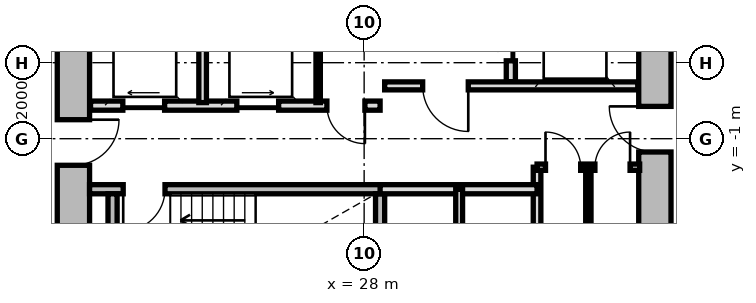
"""IFC4 building model, lengths in metres.
Left out: names, types, materials, properties, quantities, classifications, styles, units other than length and angle.
Written with IfcOpenShell. Run it as: python <this file> out.ifc"""

import sys

from ifc_helpers import new_model, si_unit, direction, frame, frame_2d, origin, place, context, subcontext, project, spatial, rectangle, extrude, source, transform, mapped, element, fill, save


model = new_model("IFC4")
c1 = context("Model", 3, precision=1e-05, world=origin(), true_north=direction((0.0, 1.0)))
c2 = subcontext(c1, "Body", "Model", "MODEL_VIEW")
j1 = project(units=[si_unit("LENGTHUNIT", "METRE"), si_unit("PLANEANGLEUNIT", "RADIAN")], contexts=[c1])
p1 = place(None, origin())
s1 = spatial("IfcSite", under=j1, at=p1, CompositionType="ELEMENT")
p2 = place(p1, origin())
s2 = spatial("IfcBuilding", under=s1, at=p2, CompositionType="ELEMENT")
p3 = place(p2, frame((0.0, 0.0, 49.05)))
s3 = spatial("IfcBuildingStorey", under=s2, at=p3, CompositionType="ELEMENT", Elevation=49.05)
m1 = source(origin(), c2, "Body", "SweptSolid", [
    extrude(rectangle(XDim=11.0, YDim=0.85, at=frame_2d((5.5, 0.0))), origin(), (0.0, 0.0, 1.0), 2.79),
])
p4 = place(p3, frame((20.35, -5.5, 0.0), z_axis=(0.0, 0.0, 1.0), x_axis=(0.0, 1.0, 0.0)))
e1 = element("IfcWall", 1, at=p4, inside=s3, PredefinedType="SHEAR", context=c2, shape_type="MappedRepresentation", body=[
    mapped(m1, transform((0.0, 0.0, 0.0), x_axis=(1.0, 0.0, 0.0), y_axis=(0.0, 1.0, 0.0), z_axis=(0.0, 0.0, 1.0), scale=1.0)),
])
p5 = place(p4, frame((3.8, 0.0, 0.0)))
e2 = element("IfcOpeningElement", 2, at=p5, cuts=e1, PredefinedType="OPENING", context=c2, shape_type="SweptSolid", body=[
    extrude(rectangle(XDim=1.2, YDim=2.15, at=frame_2d((0.6, 1.075))), frame((0.0, 0.435, 0.0), z_axis=(0.0, -1.0, 0.0), x_axis=(1.0, 0.0, 0.0)), (0.0, 0.0, 1.0), 0.87),
])
p6 = place(p3, frame((35.65, 5.5, 0.0), z_axis=(0.0, 0.0, 1.0), x_axis=(0.0, -1.0, 0.0)))
e3 = element("IfcWall", 3, at=p6, inside=s3, PredefinedType="SHEAR", context=c2, shape_type="MappedRepresentation", body=[
    mapped(m1, transform((0.0, 0.0, 0.0), x_axis=(1.0, 0.0, 0.0), y_axis=(0.0, 1.0, 0.0), z_axis=(0.0, 0.0, 1.0), scale=1.0)),
])
p7 = place(p6, frame((5.65, 0.0, 0.0)))
e4 = element("IfcOpeningElement", 4, at=p7, cuts=e3, PredefinedType="OPENING", context=c2, shape_type="SweptSolid", body=[
    extrude(rectangle(XDim=1.2, YDim=2.15, at=frame_2d((0.6, 1.075))), frame((0.0, 0.435, 0.0), z_axis=(0.0, -1.0, 0.0), x_axis=(1.0, 0.0, 0.0)), (0.0, 0.0, 1.0), 0.87),
])
m2 = source(origin(), c2, "Body", "SweptSolid", [
    extrude(rectangle(XDim=7.765, YDim=0.24, at=frame_2d((3.883, 0.0))), origin(), (0.0, 0.0, 1.0), 2.79),
])
p8 = place(p3, frame((20.775, -2.33, 0.0), z_axis=(0.0, 0.0, 1.0), x_axis=(1.0, 0.0, 0.0)))
e5 = element("IfcWall", 5, at=p8, inside=s3, PredefinedType="PARTITIONING", context=c2, shape_type="MappedRepresentation", body=[
    mapped(m2, transform((0.0, 0.0, 0.0), x_axis=(1.0, 0.0, 0.0), y_axis=(0.0, 1.0, 0.0), z_axis=(0.0, 0.0, 1.0), scale=1.0)),
])
p9 = place(p8, frame((0.885, 0.0, 0.0)))
e6 = element("IfcOpeningElement", 6, at=p9, cuts=e5, PredefinedType="OPENING", context=c2, shape_type="SweptSolid", body=[
    extrude(rectangle(XDim=1.1, YDim=2.15, at=frame_2d((0.55, 1.075))), frame((0.0, 0.13, 0.0), z_axis=(0.0, -1.0, 0.0), x_axis=(1.0, 0.0, 0.0)), (0.0, 0.0, 1.0), 0.26),
])
m3 = source(origin(), c2, "Body", "SweptSolid", [
    extrude(rectangle(XDim=3.075, YDim=0.24, at=frame_2d((1.538, 0.0))), origin(), (0.0, 0.0, 1.0), 2.79),
])
for number, where, z_axis, x_axis in (
    (7, (21.38, -5.525, 0.0), (0.0, 0.0, 1.0), (0.0, 1.0, 0.0)),
    (8, (28.42, -5.525, 0.0), (0.0, 0.0, 1.0), (0.0, 1.0, 0.0)),
):
    element("IfcWall", number, at=place(p3, frame(where, z_axis=z_axis, x_axis=x_axis)), inside=s3, PredefinedType="PARTITIONING", context=c2, shape_type="MappedRepresentation", body=[
        mapped(m3, transform((0.0, 0.0, 0.0), x_axis=(1.0, 0.0, 0.0), y_axis=(0.0, 1.0, 0.0), z_axis=(0.0, 0.0, 1.0), scale=1.0)),
    ])
m4 = source(origin(), c2, "Body", "SweptSolid", [
    extrude(rectangle(XDim=5.0, YDim=0.24, at=frame_2d((2.5, 0.0))), origin(), (0.0, 0.0, 1.0), 2.775),
])
p10 = place(p3, frame((31.86, 0.5, 0.0), z_axis=(0.0, 0.0, 1.0), x_axis=(0.0, 1.0, 0.0)))
e9 = element("IfcWall", 9, at=p10, inside=s3, PredefinedType="PARTITIONING", context=c2, shape_type="MappedRepresentation", body=[
    mapped(m4, transform((0.0, 0.0, 0.0), x_axis=(1.0, 0.0, 0.0), y_axis=(0.0, 1.0, 0.0), z_axis=(0.0, 0.0, 1.0), scale=1.0)),
])
p11 = place(p10, frame((3.05, 0.0, 0.0)))
e10 = element("IfcOpeningElement", 10, at=p11, cuts=e9, PredefinedType="OPENING", context=c2, shape_type="SweptSolid", body=[
    extrude(rectangle(XDim=1.3, YDim=2.2, at=frame_2d((0.65, 1.1))), frame((0.0, 0.13, 0.0), z_axis=(0.0, -1.0, 0.0), x_axis=(1.0, 0.0, 0.0)), (0.0, 0.0, 1.0), 0.26),
])
p12 = place(p10, frame((0.55, 0.0, 0.0)))
e11 = element("IfcOpeningElement", 11, at=p12, cuts=e9, PredefinedType="OPENING", context=c2, shape_type="SweptSolid", body=[
    extrude(rectangle(XDim=1.3, YDim=2.2, at=frame_2d((0.65, 1.1))), frame((0.0, 0.13, 0.0), z_axis=(0.0, -1.0, 0.0), x_axis=(1.0, 0.0, 0.0)), (0.0, 0.0, 1.0), 0.26),
])
m5 = source(origin(), c2, "Body", "SweptSolid", [
    extrude(rectangle(XDim=6.66, YDim=0.21, at=frame_2d((3.33, 0.0))), origin(), (0.0, 0.0, 1.0), 2.775),
])
p13 = place(p3, frame((28.54, 0.39, 0.0), z_axis=(0.0, 0.0, 1.0), x_axis=(1.0, 0.0, 0.0)))
e12 = element("IfcWall", 12, at=p13, inside=s3, PredefinedType="PARTITIONING", context=c2, shape_type="MappedRepresentation", body=[
    mapped(m5, transform((0.0, 0.0, 0.0), x_axis=(1.0, 0.0, 0.0), y_axis=(0.0, 1.0, 0.0), z_axis=(0.0, 0.0, 1.0), scale=1.0)),
])
p14 = place(p13, frame((1.0, 0.0, 0.0)))
e13 = element("IfcOpeningElement", 13, at=p14, cuts=e12, PredefinedType="OPENING", context=c2, shape_type="SweptSolid", body=[
    extrude(rectangle(XDim=1.2, YDim=2.15, at=frame_2d((0.6, 1.075))), frame((0.0, 0.115, 0.0), z_axis=(0.0, -1.0, 0.0), x_axis=(1.0, 0.0, 0.0)), (0.0, 0.0, 1.0), 0.23),
])
m6 = source(origin(), c2, "Body", "SweptSolid", [
    extrude(rectangle(XDim=7.62, YDim=0.24, at=frame_2d((3.81, 0.0))), origin(), (0.0, 0.0, 1.0), 2.775),
])
p15 = place(p3, frame((20.8, -0.13, 0.0), z_axis=(0.0, 0.0, 1.0), x_axis=(1.0, 0.0, 0.0)))
e14 = element("IfcWall", 14, at=p15, inside=s3, PredefinedType="PARTITIONING", context=c2, shape_type="MappedRepresentation", body=[
    mapped(m6, transform((0.0, 0.0, 0.0), x_axis=(1.0, 0.0, 0.0), y_axis=(0.0, 1.0, 0.0), z_axis=(0.0, 0.0, 1.0), scale=1.0)),
])
p16 = place(p15, frame((6.22, 0.0, 0.0)))
e15 = element("IfcOpeningElement", 15, at=p16, cuts=e14, PredefinedType="OPENING", context=c2, shape_type="SweptSolid", body=[
    extrude(rectangle(XDim=1.0, YDim=2.1, at=frame_2d((0.5, 1.05))), frame((0.0, 0.13, 0.0), z_axis=(0.0, -1.0, 0.0), x_axis=(1.0, 0.0, 0.0)), (0.0, 0.0, 1.0), 0.26),
])
p17 = place(p15, frame((0.85, 0.0, 0.0)))
e16 = element("IfcOpeningElement", 16, at=p17, cuts=e14, PredefinedType="OPENING", context=c2, shape_type="SweptSolid", body=[
    extrude(rectangle(XDim=1.1, YDim=2.2, at=frame_2d((0.55, 1.1))), frame((0.0, 0.13, 0.0), z_axis=(0.0, -1.0, 0.0), x_axis=(1.0, 0.0, 0.0)), (0.0, 0.0, 1.0), 0.26),
])
p18 = place(p15, frame((3.85, 0.0, 0.0)))
e17 = element("IfcOpeningElement", 17, at=p18, cuts=e14, PredefinedType="OPENING", context=c2, shape_type="SweptSolid", body=[
    extrude(rectangle(XDim=1.1, YDim=2.2, at=frame_2d((0.55, 1.1))), frame((0.0, 0.13, 0.0), z_axis=(0.0, -1.0, 0.0), x_axis=(1.0, 0.0, 0.0)), (0.0, 0.0, 1.0), 0.26),
])
m7 = source(origin(), c2, "Body", "SweptSolid", [
    extrude(rectangle(XDim=2.33, YDim=0.115, at=frame_2d((1.165, 0.0))), origin(), (0.0, 0.0, 1.0), 2.775),
])
p19 = place(p3, frame((26.79, -0.05, 0.0), z_axis=(0.0, 0.0, 1.0), x_axis=(0.0, 1.0, 0.0)))
e18 = element("IfcWall", 18, at=p19, inside=s3, PredefinedType="PARTITIONING", context=c2, shape_type="MappedRepresentation", body=[
    mapped(m7, transform((0.0, 0.0, 0.0), x_axis=(1.0, 0.0, 0.0), y_axis=(0.0, 1.0, 0.0), z_axis=(0.0, 0.0, 1.0), scale=1.0)),
])
m8 = source(origin(), c2, "Body", "SweptSolid", [
    extrude(rectangle(XDim=2.33, YDim=0.2, at=frame_2d((1.165, 0.0))), origin(), (0.0, 0.0, 1.0), 2.775),
])
p20 = place(p3, frame((23.75, -0.05, 0.0), z_axis=(0.0, 0.0, 1.0), x_axis=(0.0, 1.0, 0.0)))
e19 = element("IfcWall", 19, at=p20, inside=s3, PredefinedType="PARTITIONING", context=c2, shape_type="MappedRepresentation", body=[
    mapped(m8, transform((0.0, 0.0, 0.0), x_axis=(1.0, 0.0, 0.0), y_axis=(0.0, 1.0, 0.0), z_axis=(0.0, 0.0, 1.0), scale=1.0)),
])
m9 = source(origin(), c2, "Body", "SweptSolid", [
    extrude(rectangle(XDim=3.8, YDim=0.2, at=frame_2d((1.9, 0.0))), origin(), (0.0, 0.0, 1.0), 2.775),
])
p21 = place(p3, frame((32.55, -5.55, 0.0), z_axis=(0.0, 0.0, 1.0), x_axis=(0.0, 1.0, 0.0)))
e20 = element("IfcWall", 20, at=p21, inside=s3, PredefinedType="PARTITIONING", context=c2, shape_type="MappedRepresentation", body=[
    mapped(m9, transform((0.0, 0.0, 0.0), x_axis=(1.0, 0.0, 0.0), y_axis=(0.0, 1.0, 0.0), z_axis=(0.0, 0.0, 1.0), scale=1.0)),
])
m10 = source(origin(), c2, "Body", "SweptSolid", [
    extrude(rectangle(XDim=4.13, YDim=0.24, at=frame_2d((2.065, 0.0))), origin(), (0.0, 0.0, 1.0), 2.775),
])
p22 = place(p3, frame((28.42, -2.33, 0.0), z_axis=(0.0, 0.0, 1.0), x_axis=(1.0, 0.0, 0.0)))
e21 = element("IfcWall", 21, at=p22, inside=s3, PredefinedType="PARTITIONING", context=c2, shape_type="MappedRepresentation", body=[
    mapped(m10, transform((0.0, 0.0, 0.0), x_axis=(1.0, 0.0, 0.0), y_axis=(0.0, 1.0, 0.0), z_axis=(0.0, 0.0, 1.0), scale=1.0)),
])
m11 = source(origin(), c2, "Body", "SweptSolid", [
    extrude(rectangle(XDim=3.22, YDim=0.18, at=frame_2d((1.61, 0.0))), origin(), (0.0, 0.0, 1.0), 2.775),
])
p23 = place(p3, frame((30.5, -5.55, 0.0), z_axis=(0.0, 0.0, 1.0), x_axis=(0.0, 1.0, 0.0)))
e22 = element("IfcWall", 22, at=p23, inside=s3, PredefinedType="PARTITIONING", context=c2, shape_type="MappedRepresentation", body=[
    mapped(m11, transform((0.0, 0.0, 0.0), x_axis=(1.0, 0.0, 0.0), y_axis=(0.0, 1.0, 0.0), z_axis=(0.0, 0.0, 1.0), scale=1.0)),
])
m12 = source(origin(), c2, "Body", "SweptSolid", [
    extrude(rectangle(XDim=2.7, YDim=0.165, at=frame_2d((1.35, 0.0))), origin(), (0.0, 0.0, 1.0), 2.775),
])
p24 = place(p3, frame((32.55, -1.75, 0.0), z_axis=(0.0, 0.0, 1.0), x_axis=(1.0, 0.0, 0.0)))
e23 = element("IfcWall", 23, at=p24, inside=s3, PredefinedType="PARTITIONING", context=c2, shape_type="MappedRepresentation", body=[
    mapped(m12, transform((0.0, 0.0, 0.0), x_axis=(1.0, 0.0, 0.0), y_axis=(0.0, 1.0, 0.0), z_axis=(0.0, 0.0, 1.0), scale=1.0)),
])
p25 = place(p24, frame((0.222, 0.0, 0.0)))
e24 = element("IfcOpeningElement", 24, at=p25, cuts=e23, PredefinedType="OPENING", context=c2, shape_type="SweptSolid", body=[
    extrude(rectangle(XDim=0.925, YDim=2.1, at=frame_2d((0.462, 1.05))), frame((0.0, 0.093, 0.0), z_axis=(0.0, -1.0, 0.0), x_axis=(1.0, 0.0, 0.0)), (0.0, 0.0, 1.0), 0.185),
])
p26 = place(p24, frame((1.522, 0.0, 0.0)))
e25 = element("IfcOpeningElement", 25, at=p26, cuts=e23, PredefinedType="OPENING", context=c2, shape_type="SweptSolid", body=[
    extrude(rectangle(XDim=0.925, YDim=2.1, at=frame_2d((0.462, 1.05))), frame((0.0, 0.093, 0.0), z_axis=(0.0, -1.0, 0.0), x_axis=(1.0, 0.0, 0.0)), (0.0, 0.0, 1.0), 0.185),
])
m13 = source(origin(), c2, "Body", "SweptSolid", [
    extrude(rectangle(XDim=3.8, YDim=0.14, at=frame_2d((1.9, 0.0))), origin(), (0.0, 0.0, 1.0), 2.775),
])
p27 = place(p3, frame((33.9, -5.55, 0.0), z_axis=(0.0, 0.0, 1.0), x_axis=(0.0, 1.0, 0.0)))
e26 = element("IfcWall", 26, at=p27, inside=s3, PredefinedType="PARTITIONING", context=c2, shape_type="MappedRepresentation", body=[
    mapped(m13, transform((0.0, 0.0, 0.0), x_axis=(1.0, 0.0, 0.0), y_axis=(0.0, 1.0, 0.0), z_axis=(0.0, 0.0, 1.0), scale=1.0)),
])
m14 = source(origin(), c2, "Body", "SweptSolid", [
    extrude(rectangle(XDim=1.1, YDim=2.15, at=frame_2d((0.55, 1.075))), frame((0.0, 0.025, 0.0), z_axis=(0.0, -1.0, 0.0), x_axis=(1.0, 0.0, 0.0)), (0.0, 0.0, 1.0), 0.05),
])
p28 = place(p9, frame((1.1, 0.0, 0.0), z_axis=(0.0, 0.0, 1.0), x_axis=(-1.0, 0.0, 0.0)))
e27 = element("IfcDoor", 27, at=p28, inside=s3, OperationType="SINGLE_SWING_RIGHT", PredefinedType="DOOR", context=c2, shape_type="MappedRepresentation", body=[
    mapped(m14, transform((0.0, 0.0, 0.0), x_axis=(1.0, 0.0, 0.0), y_axis=(0.0, 1.0, 0.0), z_axis=(0.0, 0.0, 1.0), scale=1.0)),
])
fill(e6, e27)
m15 = source(origin(), c2, "Body", "SweptSolid", [
    extrude(rectangle(XDim=1.3, YDim=2.2, at=frame_2d((0.65, 1.1))), frame((0.0, 0.025, 0.0), z_axis=(0.0, -1.0, 0.0), x_axis=(1.0, 0.0, 0.0)), (0.0, 0.0, 1.0), 0.05),
])
p29 = place(p12, origin())
e28 = element("IfcDoor", 28, at=p29, inside=s3, OperationType="SLIDING_TO_RIGHT", PredefinedType="DOOR", context=c2, shape_type="MappedRepresentation", body=[
    mapped(m15, transform((0.0, 0.0, 0.0), x_axis=(1.0, 0.0, 0.0), y_axis=(0.0, 1.0, 0.0), z_axis=(0.0, 0.0, 1.0), scale=1.0)),
])
fill(e11, e28)
m16 = source(origin(), c2, "Body", "SweptSolid", [
    extrude(rectangle(XDim=1.2, YDim=2.15, at=frame_2d((0.6, 1.075))), frame((0.0, 0.025, 0.0), z_axis=(0.0, -1.0, 0.0), x_axis=(1.0, 0.0, 0.0)), (0.0, 0.0, 1.0), 0.05),
])
p30 = place(p14, frame((1.2, 0.0, 0.0), z_axis=(0.0, 0.0, 1.0), x_axis=(-1.0, 0.0, 0.0)))
e29 = element("IfcDoor", 29, at=p30, inside=s3, OperationType="SINGLE_SWING_LEFT", PredefinedType="DOOR", context=c2, shape_type="MappedRepresentation", body=[
    mapped(m16, transform((0.0, 0.0, 0.0), x_axis=(1.0, 0.0, 0.0), y_axis=(0.0, 1.0, 0.0), z_axis=(0.0, 0.0, 1.0), scale=1.0)),
])
fill(e13, e29)
p31 = place(p5, frame((1.2, 0.0, 0.0), z_axis=(0.0, 0.0, 1.0), x_axis=(-1.0, 0.0, 0.0)))
e30 = element("IfcDoor", 30, at=p31, inside=s3, OperationType="SINGLE_SWING_LEFT", PredefinedType="DOOR", context=c2, shape_type="MappedRepresentation", body=[
    mapped(m16, transform((0.0, 0.0, 0.0), x_axis=(1.0, 0.0, 0.0), y_axis=(0.0, 1.0, 0.0), z_axis=(0.0, 0.0, 1.0), scale=1.0)),
])
fill(e2, e30)
p32 = place(p7, frame((1.2, 0.0, 0.0), z_axis=(0.0, 0.0, 1.0), x_axis=(-1.0, 0.0, 0.0)))
e31 = element("IfcDoor", 31, at=p32, inside=s3, OperationType="SINGLE_SWING_RIGHT", PredefinedType="DOOR", context=c2, shape_type="MappedRepresentation", body=[
    mapped(m16, transform((0.0, 0.0, 0.0), x_axis=(1.0, 0.0, 0.0), y_axis=(0.0, 1.0, 0.0), z_axis=(0.0, 0.0, 1.0), scale=1.0)),
])
fill(e4, e31)
m17 = source(origin(), c2, "Body", "SweptSolid", [
    extrude(rectangle(XDim=1.0, YDim=2.1, at=frame_2d((0.5, 1.05))), frame((0.0, 0.025, 0.0), z_axis=(0.0, -1.0, 0.0), x_axis=(1.0, 0.0, 0.0)), (0.0, 0.0, 1.0), 0.05),
])
p33 = place(p16, frame((1.0, 0.0, 0.0), z_axis=(0.0, 0.0, 1.0), x_axis=(-1.0, 0.0, 0.0)))
e32 = element("IfcDoor", 32, at=p33, inside=s3, OperationType="SINGLE_SWING_LEFT", PredefinedType="DOOR", context=c2, shape_type="MappedRepresentation", body=[
    mapped(m17, transform((0.0, 0.0, 0.0), x_axis=(1.0, 0.0, 0.0), y_axis=(0.0, 1.0, 0.0), z_axis=(0.0, 0.0, 1.0), scale=1.0)),
])
fill(e15, e32)
m18 = source(origin(), c2, "Body", "SweptSolid", [
    extrude(rectangle(XDim=1.1, YDim=2.2, at=frame_2d((0.55, 1.1))), frame((0.0, 0.025, 0.0), z_axis=(0.0, -1.0, 0.0), x_axis=(1.0, 0.0, 0.0)), (0.0, 0.0, 1.0), 0.05),
])
p34 = place(p17, origin())
e33 = element("IfcDoor", 33, at=p34, inside=s3, OperationType="SLIDING_TO_LEFT", PredefinedType="DOOR", context=c2, shape_type="MappedRepresentation", body=[
    mapped(m18, transform((0.0, 0.0, 0.0), x_axis=(1.0, 0.0, 0.0), y_axis=(0.0, 1.0, 0.0), z_axis=(0.0, 0.0, 1.0), scale=1.0)),
])
fill(e16, e33)
p35 = place(p18, origin())
e34 = element("IfcDoor", 34, at=p35, inside=s3, OperationType="SLIDING_TO_RIGHT", PredefinedType="DOOR", context=c2, shape_type="MappedRepresentation", body=[
    mapped(m18, transform((0.0, 0.0, 0.0), x_axis=(1.0, 0.0, 0.0), y_axis=(0.0, 1.0, 0.0), z_axis=(0.0, 0.0, 1.0), scale=1.0)),
])
fill(e17, e34)
m19 = source(origin(), c2, "Body", "SweptSolid", [
    extrude(rectangle(XDim=0.925, YDim=2.1, at=frame_2d((0.462, 1.05))), frame((0.0, 0.025, 0.0), z_axis=(0.0, -1.0, 0.0), x_axis=(1.0, 0.0, 0.0)), (0.0, 0.0, 1.0), 0.05),
])
p36 = place(p25, origin())
e35 = element("IfcDoor", 35, at=p36, inside=s3, OperationType="SINGLE_SWING_LEFT", PredefinedType="DOOR", context=c2, shape_type="MappedRepresentation", body=[
    mapped(m19, transform((0.0, 0.0, 0.0), x_axis=(1.0, 0.0, 0.0), y_axis=(0.0, 1.0, 0.0), z_axis=(0.0, 0.0, 1.0), scale=1.0)),
])
fill(e24, e35)
p37 = place(p26, origin())
e36 = element("IfcDoor", 36, at=p37, inside=s3, OperationType="SINGLE_SWING_RIGHT", PredefinedType="DOOR", context=c2, shape_type="MappedRepresentation", body=[
    mapped(m19, transform((0.0, 0.0, 0.0), x_axis=(1.0, 0.0, 0.0), y_axis=(0.0, 1.0, 0.0), z_axis=(0.0, 0.0, 1.0), scale=1.0)),
])
fill(e25, e36)
save(model, sys.argv[1])
